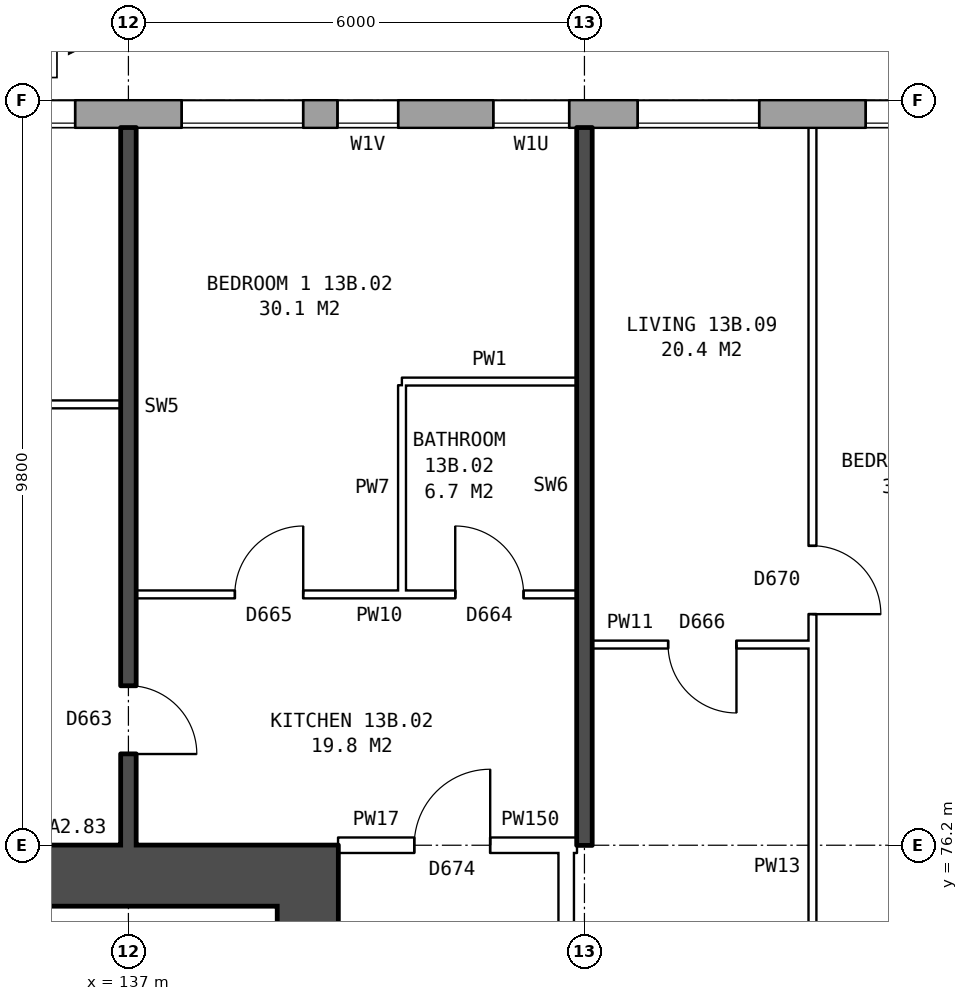
"""IFC4 building model, lengths in metres.
Left out: names, types, materials, properties, quantities, classifications, styles, units other than length and angle.
Written with IfcOpenShell. Run it as: python <this file> out.ifc"""

import sys

from ifc_helpers import new_model, si_unit, direction, frame, frame_2d, origin, place, context, subcontext, project, spatial, rectangle, extrude, element, fill, save


model = new_model("IFC4")
c1 = context("Model", 3, precision=1e-05, world=origin(), true_north=direction((0.0, 1.0)))
c2 = subcontext(c1, "Body", "Model", "MODEL_VIEW")
j1 = project(units=[si_unit("LENGTHUNIT", "METRE"), si_unit("PLANEANGLEUNIT", "RADIAN")], contexts=[c1])
p1 = place(None, origin())
s1 = spatial("IfcSite", under=j1, at=p1, CompositionType="ELEMENT")
p2 = place(p1, origin())
s2 = spatial("IfcBuilding", under=s1, at=p2, CompositionType="ELEMENT")
p3 = place(p2, frame((0.0, 0.0, 50.5)))
s3 = spatial("IfcBuildingStorey", under=s2, at=p3, CompositionType="ELEMENT", Elevation=50.5)
p4 = place(p3, frame((173.425, 85.82, 0.0), z_axis=(0.0, 0.0, 1.0), x_axis=(-1.0, 0.0, 0.0)))
e1 = element("IfcWall", 1, at=p4, inside=s3, PredefinedType="STANDARD", context=c2, shape_type="SweptSolid", body=[
    extrude(rectangle(XDim=39.351, YDim=0.36, at=frame_2d((19.675, 0.0))), origin(), (0.0, 0.0, 1.0), 2.85),
])
p5 = place(p4, frame((1.125, 0.0, 0.8)))
e2 = element("IfcOpeningElement", 2, at=p5, cuts=e1, PredefinedType="OPENING", context=c2, shape_type="SweptSolid", body=[
    extrude(rectangle(XDim=1.6, YDim=1.8, at=frame_2d((0.8, 0.9))), frame((0.0, 0.19, 0.0), z_axis=(0.0, -1.0, 0.0), x_axis=(1.0, 0.0, 0.0)), (0.0, 0.0, 1.0), 0.38),
])
p6 = place(p4, frame((4.125, 0.0, 0.8)))
e3 = element("IfcOpeningElement", 3, at=p6, cuts=e1, PredefinedType="OPENING", context=c2, shape_type="SweptSolid", body=[
    extrude(rectangle(XDim=1.6, YDim=1.8, at=frame_2d((0.8, 0.9))), frame((0.0, 0.19, 0.0), z_axis=(0.0, -1.0, 0.0), x_axis=(1.0, 0.0, 0.0)), (0.0, 0.0, 1.0), 0.38),
])
p7 = place(p4, frame((7.725, 0.0, 0.8)))
e4 = element("IfcOpeningElement", 4, at=p7, cuts=e1, PredefinedType="OPENING", context=c2, shape_type="SweptSolid", body=[
    extrude(rectangle(XDim=0.6, YDim=0.9, at=frame_2d((0.3, 0.45))), frame((0.0, 0.19, 0.0), z_axis=(0.0, -1.0, 0.0), x_axis=(1.0, 0.0, 0.0)), (0.0, 0.0, 1.0), 0.38),
])
p8 = place(p4, frame((10.125, 0.0, 0.8)))
e5 = element("IfcOpeningElement", 5, at=p8, cuts=e1, PredefinedType="OPENING", context=c2, shape_type="SweptSolid", body=[
    extrude(rectangle(XDim=1.6, YDim=1.8, at=frame_2d((0.8, 0.9))), frame((0.0, 0.19, 0.0), z_axis=(0.0, -1.0, 0.0), x_axis=(1.0, 0.0, 0.0)), (0.0, 0.0, 1.0), 0.38),
])
p9 = place(p4, frame((13.125, 0.0, 0.8)))
e6 = element("IfcOpeningElement", 6, at=p9, cuts=e1, PredefinedType="OPENING", context=c2, shape_type="SweptSolid", body=[
    extrude(rectangle(XDim=1.6, YDim=1.8, at=frame_2d((0.8, 0.9))), frame((0.0, 0.19, 0.0), z_axis=(0.0, -1.0, 0.0), x_axis=(1.0, 0.0, 0.0)), (0.0, 0.0, 1.0), 0.38),
])
p10 = place(p4, frame((16.125, 0.0, 0.8)))
e7 = element("IfcOpeningElement", 7, at=p10, cuts=e1, PredefinedType="OPENING", context=c2, shape_type="SweptSolid", body=[
    extrude(rectangle(XDim=1.6, YDim=1.8, at=frame_2d((0.8, 0.9))), frame((0.0, 0.19, 0.0), z_axis=(0.0, -1.0, 0.0), x_axis=(1.0, 0.0, 0.0)), (0.0, 0.0, 1.0), 0.38),
])
p11 = place(p4, frame((19.125, 0.0, 0.8)))
e8 = element("IfcOpeningElement", 8, at=p11, cuts=e1, PredefinedType="OPENING", context=c2, shape_type="SweptSolid", body=[
    extrude(rectangle(XDim=1.6, YDim=1.8, at=frame_2d((0.8, 0.9))), frame((0.0, 0.19, 0.0), z_axis=(0.0, -1.0, 0.0), x_axis=(1.0, 0.0, 0.0)), (0.0, 0.0, 1.0), 0.38),
])
p12 = place(p4, frame((22.125, 0.0, 0.8)))
e9 = element("IfcOpeningElement", 9, at=p12, cuts=e1, PredefinedType="OPENING", context=c2, shape_type="SweptSolid", body=[
    extrude(rectangle(XDim=1.6, YDim=1.8, at=frame_2d((0.8, 0.9))), frame((0.0, 0.19, 0.0), z_axis=(0.0, -1.0, 0.0), x_axis=(1.0, 0.0, 0.0)), (0.0, 0.0, 1.0), 0.38),
])
p13 = place(p4, frame((25.125, 0.0, 0.8)))
e10 = element("IfcOpeningElement", 10, at=p13, cuts=e1, PredefinedType="OPENING", context=c2, shape_type="SweptSolid", body=[
    extrude(rectangle(XDim=1.6, YDim=1.8, at=frame_2d((0.8, 0.9))), frame((0.0, 0.19, 0.0), z_axis=(0.0, -1.0, 0.0), x_axis=(1.0, 0.0, 0.0)), (0.0, 0.0, 1.0), 0.38),
])
p14 = place(p4, frame((28.125, 0.0, 0.8)))
e11 = element("IfcOpeningElement", 11, at=p14, cuts=e1, PredefinedType="OPENING", context=c2, shape_type="SweptSolid", body=[
    extrude(rectangle(XDim=1.6, YDim=1.8, at=frame_2d((0.8, 0.9))), frame((0.0, 0.19, 0.0), z_axis=(0.0, -1.0, 0.0), x_axis=(1.0, 0.0, 0.0)), (0.0, 0.0, 1.0), 0.38),
])
p15 = place(p4, frame((30.625, 0.0, 0.8)))
e12 = element("IfcOpeningElement", 12, at=p15, cuts=e1, PredefinedType="OPENING", context=c2, shape_type="SweptSolid", body=[
    extrude(rectangle(XDim=1.0, YDim=0.9, at=frame_2d((0.5, 0.45))), frame((0.0, 0.19, 0.0), z_axis=(0.0, -1.0, 0.0), x_axis=(1.0, 0.0, 0.0)), (0.0, 0.0, 1.0), 0.38),
])
p16 = place(p4, frame((34.125, 0.0, 0.8)))
e13 = element("IfcOpeningElement", 13, at=p16, cuts=e1, PredefinedType="OPENING", context=c2, shape_type="SweptSolid", body=[
    extrude(rectangle(XDim=1.6, YDim=1.8, at=frame_2d((0.8, 0.9))), frame((0.0, 0.19, 0.0), z_axis=(0.0, -1.0, 0.0), x_axis=(1.0, 0.0, 0.0)), (0.0, 0.0, 1.0), 0.38),
])
p17 = place(p4, frame((37.125, 0.0, 0.8)))
e14 = element("IfcOpeningElement", 14, at=p17, cuts=e1, PredefinedType="OPENING", context=c2, shape_type="SweptSolid", body=[
    extrude(rectangle(XDim=1.6, YDim=1.8, at=frame_2d((0.8, 0.9))), frame((0.0, 0.19, 0.0), z_axis=(0.0, -1.0, 0.0), x_axis=(1.0, 0.0, 0.0)), (0.0, 0.0, 1.0), 0.38),
])
p18 = place(p4, frame((8.625, 0.0, 0.8)))
e15 = element("IfcOpeningElement", 15, at=p18, cuts=e1, PredefinedType="OPENING", context=c2, shape_type="SweptSolid", body=[
    extrude(rectangle(XDim=0.6, YDim=1.5, at=frame_2d((0.3, 0.75))), frame((0.0, 0.19, 0.0), z_axis=(0.0, -1.0, 0.0), x_axis=(1.0, 0.0, 0.0)), (0.0, 0.0, 1.0), 0.38),
])
p19 = place(p4, frame((32.875, 0.0, 1.7)))
e16 = element("IfcOpeningElement", 16, at=p19, cuts=e1, PredefinedType="OPENING", context=c2, shape_type="SweptSolid", body=[
    extrude(rectangle(XDim=0.8, YDim=0.9, at=frame_2d((0.4, 0.45))), frame((0.0, 0.19, 0.0), z_axis=(0.0, -1.0, 0.0), x_axis=(1.0, 0.0, 0.0)), (0.0, 0.0, 1.0), 0.38),
])
p20 = place(p3, frame((139.36, 64.6, 0.0), z_axis=(0.0, 0.0, 1.0), x_axis=(0.0, 1.0, 0.0)))
e17 = element("IfcWall", 17, at=p20, inside=s3, PredefinedType="SHEAR", context=c2, shape_type="SweptSolid", body=[
    extrude(rectangle(XDim=10.8, YDim=0.8, at=frame_2d((5.4, 0.0))), origin(), (0.0, 0.0, 1.0), 2.85),
])
p21 = place(p20, frame((0.525, 0.0, 0.0)))
e18 = element("IfcOpeningElement", 18, at=p21, cuts=e17, PredefinedType="OPENING", context=c2, shape_type="SweptSolid", body=[
    extrude(rectangle(XDim=1.1, YDim=2.1, at=frame_2d((0.55, 1.05))), frame((0.0, 0.41, 0.0), z_axis=(0.0, -1.0, 0.0), x_axis=(1.0, 0.0, 0.0)), (0.0, 0.0, 1.0), 0.82),
])
p22 = place(p20, frame((9.1, 0.0, 0.0)))
e19 = element("IfcOpeningElement", 19, at=p22, cuts=e17, PredefinedType="OPENING", context=c2, shape_type="SweptSolid", body=[
    extrude(rectangle(XDim=1.1, YDim=2.1, at=frame_2d((0.55, 1.05))), frame((0.0, 0.41, 0.0), z_axis=(0.0, -1.0, 0.0), x_axis=(1.0, 0.0, 0.0)), (0.0, 0.0, 1.0), 0.82),
])
p23 = place(p20, frame((7.325, 0.0, 0.0)))
e20 = element("IfcOpeningElement", 20, at=p23, cuts=e17, PredefinedType="OPENING", context=c2, shape_type="SweptSolid", body=[
    extrude(rectangle(XDim=0.85, YDim=2.1, at=frame_2d((0.425, 1.05))), frame((0.0, 0.41, 0.0), z_axis=(0.0, -1.0, 0.0), x_axis=(1.0, 0.0, 0.0)), (0.0, 0.0, 1.0), 0.82),
])
p24 = place(p3, frame((139.76, 75.8, 0.0), z_axis=(0.0, 0.0, 1.0), x_axis=(-1.0, 0.0, 0.0)))
e21 = element("IfcWall", 21, at=p24, inside=s3, PredefinedType="SHEAR", context=c2, shape_type="SweptSolid", body=[
    extrude(rectangle(XDim=8.4, YDim=0.8, at=frame_2d((4.2, 0.0))), origin(), (0.0, 0.0, 1.0), 2.85),
])
p25 = place(p3, frame((142.76, 63.9, 0.0), z_axis=(0.0, 0.0, 1.0), x_axis=(0.0, 1.0, 0.0)))
e22 = element("IfcWall", 22, at=p25, inside=s3, PredefinedType="PARTITIONING", context=c2, shape_type="SweptSolid", body=[
    extrude(rectangle(XDim=12.2, YDim=0.2, at=frame_2d((6.1, 0.0))), origin(), (0.0, 0.0, 1.0), 2.85),
])
p26 = place(p25, frame((5.1, 0.0, 0.0)))
e23 = element("IfcOpeningElement", 23, at=p26, cuts=e22, PredefinedType="OPENING", context=c2, shape_type="SweptSolid", body=[
    extrude(rectangle(XDim=2.0, YDim=2.1, at=frame_2d((1.0, 1.05))), frame((0.0, 0.11, 0.0), z_axis=(0.0, -1.0, 0.0), x_axis=(1.0, 0.0, 0.0)), (0.0, 0.0, 1.0), 0.22),
])
p27 = place(p3, frame((139.76, 76.2, 0.0), z_axis=(0.0, 0.0, 1.0), x_axis=(1.0, 0.0, 0.0)))
e24 = element("IfcWall", 24, at=p27, inside=s3, PredefinedType="PARTITIONING", context=c2, shape_type="SweptSolid", body=[
    extrude(rectangle(XDim=3.0, YDim=0.2, at=frame_2d((1.5, 0.0))), origin(), (0.0, 0.0, 1.0), 2.85),
])
p28 = place(p27, frame((1.0, 0.0, 0.0)))
e25 = element("IfcOpeningElement", 25, at=p28, cuts=e24, PredefinedType="OPENING", context=c2, shape_type="SweptSolid", body=[
    extrude(rectangle(XDim=1.0, YDim=2.1, at=frame_2d((0.5, 1.05))), frame((0.0, 0.11, 0.0), z_axis=(0.0, -1.0, 0.0), x_axis=(1.0, 0.0, 0.0)), (0.0, 0.0, 1.0), 0.22),
])
p29 = place(p3, frame((142.76, 76.2, 0.0), z_axis=(0.0, 0.0, 1.0), x_axis=(1.0, 0.0, 0.0)))
e26 = element("IfcWall", 26, at=p29, inside=s3, PredefinedType="PARTITIONING", context=c2, shape_type="SweptSolid", body=[
    extrude(rectangle(XDim=0.14, YDim=0.2, at=frame_2d((0.07, 0.0))), origin(), (0.0, 0.0, 1.0), 2.85),
])
p30 = place(p3, frame((143.1, 78.84, 0.0), z_axis=(0.0, 0.0, 1.0), x_axis=(1.0, 0.0, 0.0)))
e27 = element("IfcWall", 27, at=p30, inside=s3, PredefinedType="PARTITIONING", context=c2, shape_type="SweptSolid", body=[
    extrude(rectangle(XDim=2.9, YDim=0.1, at=frame_2d((1.45, 0.0))), origin(), (0.0, 0.0, 1.0), 2.85),
])
p31 = place(p30, frame((1.0, 0.0, 0.0)))
e28 = element("IfcOpeningElement", 28, at=p31, cuts=e27, PredefinedType="OPENING", context=c2, shape_type="SweptSolid", body=[
    extrude(rectangle(XDim=0.9, YDim=2.1, at=frame_2d((0.45, 1.05))), frame((0.0, 0.06, 0.0), z_axis=(0.0, -1.0, 0.0), x_axis=(1.0, 0.0, 0.0)), (0.0, 0.0, 1.0), 0.12),
])
p32 = place(p3, frame((137.1, 79.5, 0.0), z_axis=(0.0, 0.0, 1.0), x_axis=(1.0, 0.0, 0.0)))
e29 = element("IfcWall", 29, at=p32, inside=s3, PredefinedType="PARTITIONING", context=c2, shape_type="SweptSolid", body=[
    extrude(rectangle(XDim=5.8, YDim=0.1, at=frame_2d((2.9, 0.0))), origin(), (0.0, 0.0, 1.0), 2.85),
])
p33 = place(p32, frame((1.3, 0.0, 0.0)))
e30 = element("IfcOpeningElement", 30, at=p33, cuts=e29, PredefinedType="OPENING", context=c2, shape_type="SweptSolid", body=[
    extrude(rectangle(XDim=0.9, YDim=2.1, at=frame_2d((0.45, 1.05))), frame((0.0, 0.06, 0.0), z_axis=(0.0, -1.0, 0.0), x_axis=(1.0, 0.0, 0.0)), (0.0, 0.0, 1.0), 0.12),
])
p34 = place(p32, frame((4.2, 0.0, 0.0)))
e31 = element("IfcOpeningElement", 31, at=p34, cuts=e29, PredefinedType="OPENING", context=c2, shape_type="SweptSolid", body=[
    extrude(rectangle(XDim=0.9, YDim=2.1, at=frame_2d((0.45, 1.05))), frame((0.0, 0.06, 0.0), z_axis=(0.0, -1.0, 0.0), x_axis=(1.0, 0.0, 0.0)), (0.0, 0.0, 1.0), 0.12),
])
p35 = place(p3, frame((131.36, 82.0, 0.0), z_axis=(0.0, 0.0, 1.0), x_axis=(1.0, 0.0, 0.0)))
e32 = element("IfcWall", 32, at=p35, inside=s3, PredefinedType="PARTITIONING", context=c2, shape_type="SweptSolid", body=[
    extrude(rectangle(XDim=5.54, YDim=0.1, at=frame_2d((2.77, 0.0))), origin(), (0.0, 0.0, 1.0), 2.85),
])
p36 = place(p35, frame((2.32, 0.0, 0.0)))
e33 = element("IfcOpeningElement", 33, at=p36, cuts=e32, PredefinedType="OPENING", context=c2, shape_type="SweptSolid", body=[
    extrude(rectangle(XDim=0.9, YDim=2.1, at=frame_2d((0.45, 1.05))), frame((0.0, 0.06, 0.0), z_axis=(0.0, -1.0, 0.0), x_axis=(1.0, 0.0, 0.0)), (0.0, 0.0, 1.0), 0.12),
])
p37 = place(p3, frame((140.6, 82.3, 0.0), z_axis=(0.0, 0.0, 1.0), x_axis=(1.0, 0.0, 0.0)))
e34 = element("IfcWall", 34, at=p37, inside=s3, PredefinedType="PARTITIONING", context=c2, shape_type="SweptSolid", body=[
    extrude(rectangle(XDim=2.3, YDim=0.1, at=frame_2d((1.15, 0.0))), origin(), (0.0, 0.0, 1.0), 2.85),
])
p38 = place(p3, frame((137.0, 76.2, 0.0), z_axis=(0.0, 0.0, 1.0), x_axis=(0.0, 1.0, 0.0)))
e35 = element("IfcWall", 35, at=p38, inside=s3, PredefinedType="SOLIDWALL", context=c2, shape_type="SweptSolid", body=[
    extrude(rectangle(XDim=9.44, YDim=0.2, at=frame_2d((4.72, 0.0))), origin(), (0.0, 0.0, 1.0), 2.85),
])
p39 = place(p38, frame((1.2, 0.0, 0.0)))
e36 = element("IfcOpeningElement", 36, at=p39, cuts=e35, PredefinedType="OPENING", context=c2, shape_type="SweptSolid", body=[
    extrude(rectangle(XDim=0.9, YDim=2.1, at=frame_2d((0.45, 1.05))), frame((0.0, 0.11, 0.0), z_axis=(0.0, -1.0, 0.0), x_axis=(1.0, 0.0, 0.0)), (0.0, 0.0, 1.0), 0.22),
])
p40 = place(p3, frame((140.6, 79.55, 0.0), z_axis=(0.0, 0.0, 1.0), x_axis=(0.0, 1.0, 0.0)))
e37 = element("IfcWall", 37, at=p40, inside=s3, PredefinedType="PARTITIONING", context=c2, shape_type="SweptSolid", body=[
    extrude(rectangle(XDim=2.7, YDim=0.1, at=frame_2d((1.35, 0.0))), origin(), (0.0, 0.0, 1.0), 2.85),
])
p41 = place(p3, frame((143.0, 76.2, 0.0), z_axis=(0.0, 0.0, 1.0), x_axis=(0.0, 1.0, 0.0)))
e38 = element("IfcWall", 38, at=p41, inside=s3, PredefinedType="SOLIDWALL", context=c2, shape_type="SweptSolid", body=[
    extrude(rectangle(XDim=9.44, YDim=0.2, at=frame_2d((4.72, 0.0))), origin(), (0.0, 0.0, 1.0), 2.85),
])
p42 = place(p3, frame((146.0, 71.3, 0.0), z_axis=(0.0, 0.0, 1.0), x_axis=(0.0, 1.0, 0.0)))
e39 = element("IfcWall", 39, at=p42, inside=s3, PredefinedType="PARTITIONING", context=c2, shape_type="SweptSolid", body=[
    extrude(rectangle(XDim=14.34, YDim=0.1, at=frame_2d((7.17, 0.0))), origin(), (0.0, 0.0, 1.0), 2.85),
])
p43 = place(p42, frame((7.94, 0.0, 0.0)))
e40 = element("IfcOpeningElement", 40, at=p43, cuts=e39, PredefinedType="OPENING", context=c2, shape_type="SweptSolid", body=[
    extrude(rectangle(XDim=0.9, YDim=2.1, at=frame_2d((0.45, 1.05))), frame((0.0, 0.06, 0.0), z_axis=(0.0, -1.0, 0.0), x_axis=(1.0, 0.0, 0.0)), (0.0, 0.0, 1.0), 0.12),
])
p44 = place(p42, frame((0.4, 0.0, 0.0)))
e41 = element("IfcOpeningElement", 41, at=p44, cuts=e39, PredefinedType="OPENING", context=c2, shape_type="SweptSolid", body=[
    extrude(rectangle(XDim=0.9, YDim=2.1, at=frame_2d((0.45, 1.05))), frame((0.0, 0.06, 0.0), z_axis=(0.0, -1.0, 0.0), x_axis=(1.0, 0.0, 0.0)), (0.0, 0.0, 1.0), 0.12),
])
p45 = place(p13, origin())
e42 = element("IfcWindow", 42, at=p45, inside=s3, PartitioningType="SINGLE_PANEL", PredefinedType="WINDOW", context=c2, shape_type="SweptSolid", body=[
    extrude(rectangle(XDim=1.6, YDim=1.8, at=frame_2d((0.8, 0.9))), frame((0.0, 0.15, 0.0), z_axis=(0.0, -1.0, 0.0), x_axis=(1.0, 0.0, 0.0)), (0.0, 0.0, 1.0), 0.06),
])
fill(e10, e42)
p46 = place(p14, origin())
e43 = element("IfcWindow", 43, at=p46, inside=s3, PartitioningType="SINGLE_PANEL", PredefinedType="WINDOW", context=c2, shape_type="SweptSolid", body=[
    extrude(rectangle(XDim=1.6, YDim=1.8, at=frame_2d((0.8, 0.9))), frame((0.0, 0.15, 0.0), z_axis=(0.0, -1.0, 0.0), x_axis=(1.0, 0.0, 0.0)), (0.0, 0.0, 1.0), 0.06),
])
fill(e11, e43)
p47 = place(p15, origin())
e44 = element("IfcWindow", 44, at=p47, inside=s3, PartitioningType="SINGLE_PANEL", PredefinedType="WINDOW", context=c2, shape_type="SweptSolid", body=[
    extrude(rectangle(XDim=1.0, YDim=0.9, at=frame_2d((0.5, 0.45))), frame((0.0, 0.15, 0.0), z_axis=(0.0, -1.0, 0.0), x_axis=(1.0, 0.0, 0.0)), (0.0, 0.0, 1.0), 0.06),
])
fill(e12, e44)
p48 = place(p16, origin())
e45 = element("IfcWindow", 45, at=p48, inside=s3, PartitioningType="SINGLE_PANEL", PredefinedType="WINDOW", context=c2, shape_type="SweptSolid", body=[
    extrude(rectangle(XDim=1.6, YDim=1.8, at=frame_2d((0.8, 0.9))), frame((0.0, 0.15, 0.0), z_axis=(0.0, -1.0, 0.0), x_axis=(1.0, 0.0, 0.0)), (0.0, 0.0, 1.0), 0.06),
])
fill(e13, e45)
p49 = place(p17, origin())
e46 = element("IfcWindow", 46, at=p49, inside=s3, PartitioningType="SINGLE_PANEL", PredefinedType="WINDOW", context=c2, shape_type="SweptSolid", body=[
    extrude(rectangle(XDim=1.6, YDim=1.8, at=frame_2d((0.8, 0.9))), frame((0.0, 0.15, 0.0), z_axis=(0.0, -1.0, 0.0), x_axis=(1.0, 0.0, 0.0)), (0.0, 0.0, 1.0), 0.06),
])
fill(e14, e46)
p50 = place(p33, origin())
e47 = element("IfcDoor", 47, at=p50, inside=s3, OperationType="SINGLE_SWING_RIGHT", PredefinedType="DOOR", context=c2, shape_type="SweptSolid", body=[
    extrude(rectangle(XDim=0.9, YDim=2.1, at=frame_2d((0.45, 1.05))), frame((0.0, 0.025, 0.0), z_axis=(0.0, -1.0, 0.0), x_axis=(1.0, 0.0, 0.0)), (0.0, 0.0, 1.0), 0.05),
])
fill(e30, e47)
p51 = place(p28, origin())
e48 = element("IfcDoor", 48, at=p51, inside=s3, OperationType="SINGLE_SWING_RIGHT", PredefinedType="DOOR", context=c2, shape_type="SweptSolid", body=[
    extrude(rectangle(XDim=1.0, YDim=2.1, at=frame_2d((0.5, 1.05))), frame((0.0, 0.025, 0.0), z_axis=(0.0, -1.0, 0.0), x_axis=(1.0, 0.0, 0.0)), (0.0, 0.0, 1.0), 0.05),
])
fill(e25, e48)
p52 = place(p39, frame((0.9, 0.0, 0.0), z_axis=(0.0, 0.0, 1.0), x_axis=(-1.0, 0.0, 0.0)))
e49 = element("IfcDoor", 49, at=p52, inside=s3, OperationType="SINGLE_SWING_RIGHT", PredefinedType="DOOR", context=c2, shape_type="SweptSolid", body=[
    extrude(rectangle(XDim=0.9, YDim=2.1, at=frame_2d((0.45, 1.05))), frame((0.0, 0.025, 0.0), z_axis=(0.0, -1.0, 0.0), x_axis=(1.0, 0.0, 0.0)), (0.0, 0.0, 1.0), 0.05),
])
fill(e36, e49)
p53 = place(p34, origin())
e50 = element("IfcDoor", 50, at=p53, inside=s3, OperationType="SINGLE_SWING_LEFT", PredefinedType="DOOR", context=c2, shape_type="SweptSolid", body=[
    extrude(rectangle(XDim=0.9, YDim=2.1, at=frame_2d((0.45, 1.05))), frame((0.0, 0.025, 0.0), z_axis=(0.0, -1.0, 0.0), x_axis=(1.0, 0.0, 0.0)), (0.0, 0.0, 1.0), 0.05),
])
fill(e31, e50)
p54 = place(p43, frame((0.9, 0.0, 0.0), z_axis=(0.0, 0.0, 1.0), x_axis=(-1.0, 0.0, 0.0)))
e51 = element("IfcDoor", 51, at=p54, inside=s3, OperationType="SINGLE_SWING_RIGHT", PredefinedType="DOOR", context=c2, shape_type="SweptSolid", body=[
    extrude(rectangle(XDim=0.9, YDim=2.1, at=frame_2d((0.45, 1.05))), frame((0.0, 0.025, 0.0), z_axis=(0.0, -1.0, 0.0), x_axis=(1.0, 0.0, 0.0)), (0.0, 0.0, 1.0), 0.05),
])
fill(e40, e51)
p55 = place(p31, frame((0.9, 0.0, 0.0), z_axis=(0.0, 0.0, 1.0), x_axis=(-1.0, 0.0, 0.0)))
e52 = element("IfcDoor", 52, at=p55, inside=s3, OperationType="SINGLE_SWING_LEFT", PredefinedType="DOOR", context=c2, shape_type="SweptSolid", body=[
    extrude(rectangle(XDim=0.9, YDim=2.1, at=frame_2d((0.45, 1.05))), frame((0.0, 0.025, 0.0), z_axis=(0.0, -1.0, 0.0), x_axis=(1.0, 0.0, 0.0)), (0.0, 0.0, 1.0), 0.05),
])
fill(e28, e52)
p56 = place(p19, origin())
e53 = element("IfcWindow", 53, at=p56, inside=s3, PartitioningType="SINGLE_PANEL", PredefinedType="WINDOW", context=c2, shape_type="SweptSolid", body=[
    extrude(rectangle(XDim=0.8, YDim=0.9, at=frame_2d((0.4, 0.45))), frame((0.0, 0.15, 0.0), z_axis=(0.0, -1.0, 0.0), x_axis=(1.0, 0.0, 0.0)), (0.0, 0.0, 1.0), 0.06),
])
fill(e16, e53)
save(model, sys.argv[1])
